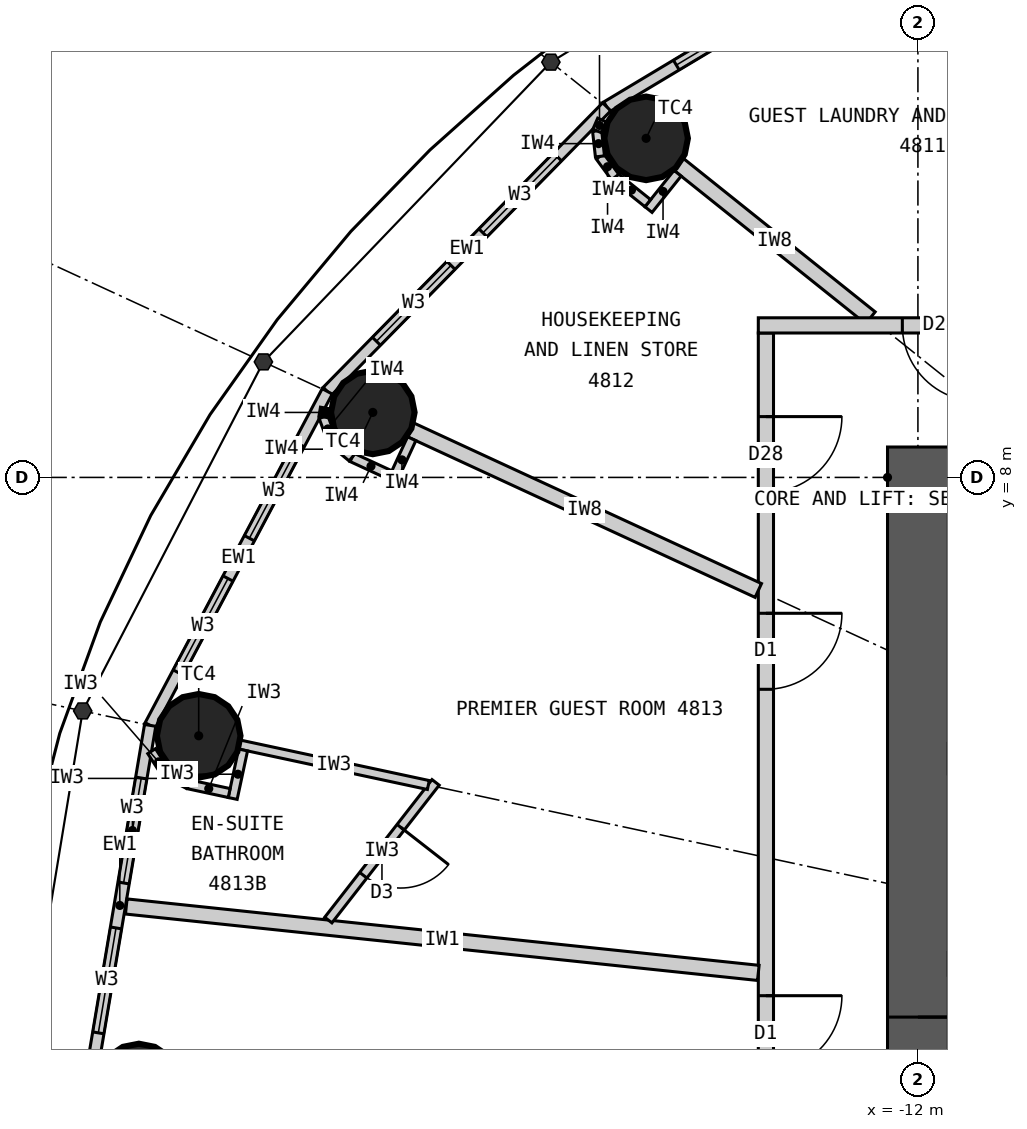
"""IFC4 building model, lengths in metres.
Left out: names, types, materials, properties, quantities, classifications, styles, units other than length and angle.
Written with IfcOpenShell. Run it as: python <this file> out.ifc"""

import sys

from ifc_helpers import new_model, si_unit, direction, frame, frame_2d, origin, origin_2d, place, context, subcontext, project, spatial, rectangle, circle, extrude, element, fill, save


model = new_model("IFC4")
c1 = context("Model", 3, precision=1e-05, world=origin(), true_north=direction((0.0, 1.0)))
c2 = subcontext(c1, "Body", "Model", "MODEL_VIEW")
j1 = project(units=[si_unit("LENGTHUNIT", "METRE"), si_unit("PLANEANGLEUNIT", "RADIAN")], contexts=[c1])
p1 = place(None, origin())
s1 = spatial("IfcSite", under=j1, at=p1, CompositionType="ELEMENT")
p2 = place(p1, origin())
s2 = spatial("IfcBuilding", under=s1, at=p2, CompositionType="ELEMENT")
p3 = place(p2, frame((0.0, 0.0, 179.7)))
s3 = spatial("IfcBuildingStorey", under=s2, at=p3, CompositionType="ELEMENT", Elevation=179.7)
for number, where, z_axis, x_axis in (
    (1, (-15.576, 12.461, 0.0), (0.0, 0.0, 1.0), (1.0, 0.0, 0.0)),
    (2, (-19.172, 8.855, 0.0), (0.0, 0.0, 1.0), (1.0, 0.0, 0.0)),
    (3, (-21.463, 4.601, 0.0), (0.0, 0.0, 1.0), (1.0, 0.0, 0.0)),
    (4, (-22.25, 0.0, 0.0), (0.0, 0.0, 1.0), (1.0, 0.0, 0.0)),
):
    element("IfcColumn", number, at=place(p3, frame(where, z_axis=z_axis, x_axis=x_axis)), inside=s3, PredefinedType="COLUMN", context=c2, shape_type="SweptSolid", body=[
        extrude(circle(Radius=0.55, at=origin_2d()), origin(), (0.0, 0.0, 1.0), 3.3),
    ])
p4 = place(p3, frame((-12.4, 8.0, 0.0), z_axis=(0.0, 0.0, 1.0), x_axis=(1.0, 0.0, 0.0)))
e5 = element("IfcWall", 5, at=p4, inside=s3, PredefinedType="SHEAR", context=c2, shape_type="SweptSolid", body=[
    extrude(rectangle(XDim=24.8, YDim=0.8, at=frame_2d((12.4, 0.0))), origin(), (0.0, 0.0, 1.0), 3.3),
])
p5 = place(p4, frame((11.1, 0.0, 0.0)))
e6 = element("IfcOpeningElement", 6, at=p5, cuts=e5, PredefinedType="OPENING", context=c2, shape_type="SweptSolid", body=[
    extrude(rectangle(XDim=1.2, YDim=2.2, at=frame_2d((0.6, 1.1))), frame((0.0, 0.41, 0.0), z_axis=(0.0, -1.0, 0.0), x_axis=(1.0, 0.0, 0.0)), (0.0, 0.0, 1.0), 0.82),
])
p6 = place(p4, frame((18.7, 0.0, 0.0)))
e7 = element("IfcOpeningElement", 7, at=p6, cuts=e5, PredefinedType="OPENING", context=c2, shape_type="SweptSolid", body=[
    extrude(rectangle(XDim=0.9, YDim=2.2, at=frame_2d((0.45, 1.1))), frame((0.0, 0.41, 0.0), z_axis=(0.0, -1.0, 0.0), x_axis=(1.0, 0.0, 0.0)), (0.0, 0.0, 1.0), 0.82),
])
p7 = place(p3, frame((-12.0, 7.6, 0.0), z_axis=(0.0, 0.0, 1.0), x_axis=(0.0, -1.0, 0.0)))
e8 = element("IfcWall", 8, at=p7, inside=s3, PredefinedType="SHEAR", context=c2, shape_type="SweptSolid", body=[
    extrude(rectangle(XDim=15.2, YDim=0.8, at=frame_2d((7.6, 0.0))), origin(), (0.0, 0.0, 1.0), 3.3),
])
p8 = place(p7, frame((6.7, 0.0, 0.0)))
e9 = element("IfcOpeningElement", 9, at=p8, cuts=e8, PredefinedType="OPENING", context=c2, shape_type="SweptSolid", body=[
    extrude(rectangle(XDim=1.8, YDim=2.2, at=frame_2d((0.9, 1.1))), frame((0.0, 0.41, 0.0), z_axis=(0.0, -1.0, 0.0), x_axis=(1.0, 0.0, 0.0)), (0.0, 0.0, 1.0), 0.82),
])
p9 = place(p3, frame((-11.346, 15.722, 0.0), z_axis=(0.0, 0.0, 1.0), x_axis=(-0.857695199231, -0.514158482587, 0.0)))
e10 = element("IfcWall", 10, at=p9, inside=s3, PredefinedType="ELEMENTEDWALL", context=c2, shape_type="SweptSolid", body=[
    extrude(rectangle(XDim=5.536, YDim=0.15, at=frame_2d((2.768, 0.0))), origin(), (0.0, 0.0, 1.0), 3.12),
])
p10 = place(p9, frame((1.068, 0.0, 0.9)))
e11 = element("IfcOpeningElement", 11, at=p10, cuts=e10, PredefinedType="OPENING", context=c2, shape_type="SweptSolid", body=[
    extrude(rectangle(XDim=1.4, YDim=1.9, at=frame_2d((0.7, 0.95))), frame((0.0, 0.085, 0.0), z_axis=(0.0, -1.0, 0.0), x_axis=(1.0, 0.0, 0.0)), (0.0, 0.0, 1.0), 0.17),
])
p11 = place(p9, frame((3.068, 0.0, 0.9)))
e12 = element("IfcOpeningElement", 12, at=p11, cuts=e10, PredefinedType="OPENING", context=c2, shape_type="SweptSolid", body=[
    extrude(rectangle(XDim=1.4, YDim=1.9, at=frame_2d((0.7, 0.95))), frame((0.0, 0.085, 0.0), z_axis=(0.0, -1.0, 0.0), x_axis=(1.0, 0.0, 0.0)), (0.0, 0.0, 1.0), 0.17),
])
p12 = place(p3, frame((-16.095, 12.876, 0.0), z_axis=(0.0, 0.0, 1.0), x_axis=(-0.700727467776, -0.71342905457, 0.0)))
e13 = element("IfcWall", 13, at=p12, inside=s3, PredefinedType="ELEMENTEDWALL", context=c2, shape_type="SweptSolid", body=[
    extrude(rectangle(XDim=5.247, YDim=0.15, at=frame_2d((2.624, 0.0))), origin(), (0.0, 0.0, 1.0), 3.12),
])
p13 = place(p12, frame((0.924, 0.0, 0.9)))
e14 = element("IfcOpeningElement", 14, at=p13, cuts=e13, PredefinedType="OPENING", context=c2, shape_type="SweptSolid", body=[
    extrude(rectangle(XDim=1.4, YDim=1.9, at=frame_2d((0.7, 0.95))), frame((0.0, 0.085, 0.0), z_axis=(0.0, -1.0, 0.0), x_axis=(1.0, 0.0, 0.0)), (0.0, 0.0, 1.0), 0.17),
])
p14 = place(p12, frame((2.924, 0.0, 0.9)))
e15 = element("IfcOpeningElement", 15, at=p14, cuts=e13, PredefinedType="OPENING", context=c2, shape_type="SweptSolid", body=[
    extrude(rectangle(XDim=1.4, YDim=1.9, at=frame_2d((0.7, 0.95))), frame((0.0, 0.085, 0.0), z_axis=(0.0, -1.0, 0.0), x_axis=(1.0, 0.0, 0.0)), (0.0, 0.0, 1.0), 0.17),
])
p15 = place(p3, frame((-19.772, 9.132, 0.0), z_axis=(0.0, 0.0, 1.0), x_axis=(-0.468428906714, -0.883501193748, 0.0)))
e16 = element("IfcWall", 16, at=p15, inside=s3, PredefinedType="ELEMENTEDWALL", context=c2, shape_type="SweptSolid", body=[
    extrude(rectangle(XDim=4.974, YDim=0.15, at=frame_2d((2.487, 0.0))), origin(), (0.0, 0.0, 1.0), 3.12),
])
p16 = place(p15, frame((0.787, 0.0, 0.9)))
e17 = element("IfcOpeningElement", 17, at=p16, cuts=e16, PredefinedType="OPENING", context=c2, shape_type="SweptSolid", body=[
    extrude(rectangle(XDim=1.4, YDim=1.9, at=frame_2d((0.7, 0.95))), frame((0.0, 0.085, 0.0), z_axis=(0.0, -1.0, 0.0), x_axis=(1.0, 0.0, 0.0)), (0.0, 0.0, 1.0), 0.17),
])
p17 = place(p15, frame((2.787, 0.0, 0.9)))
e18 = element("IfcOpeningElement", 18, at=p17, cuts=e16, PredefinedType="OPENING", context=c2, shape_type="SweptSolid", body=[
    extrude(rectangle(XDim=1.4, YDim=1.9, at=frame_2d((0.7, 0.95))), frame((0.0, 0.085, 0.0), z_axis=(0.0, -1.0, 0.0), x_axis=(1.0, 0.0, 0.0)), (0.0, 0.0, 1.0), 0.17),
])
p18 = place(p3, frame((-22.102, 4.738, 0.0), z_axis=(0.0, 0.0, 1.0), x_axis=(-0.166162111254, -0.986098449843, 0.0)))
e19 = element("IfcWall", 19, at=p18, inside=s3, PredefinedType="ELEMENTEDWALL", context=c2, shape_type="SweptSolid", body=[
    extrude(rectangle(XDim=4.805, YDim=0.15, at=frame_2d((2.402, 0.0))), origin(), (0.0, 0.0, 1.0), 3.12),
])
p19 = place(p18, frame((0.702, 0.0, 0.9)))
e20 = element("IfcOpeningElement", 20, at=p19, cuts=e19, PredefinedType="OPENING", context=c2, shape_type="SweptSolid", body=[
    extrude(rectangle(XDim=1.4, YDim=1.9, at=frame_2d((0.7, 0.95))), frame((0.0, 0.085, 0.0), z_axis=(0.0, -1.0, 0.0), x_axis=(1.0, 0.0, 0.0)), (0.0, 0.0, 1.0), 0.17),
])
p20 = place(p18, frame((2.702, 0.0, 0.9)))
e21 = element("IfcOpeningElement", 21, at=p20, cuts=e19, PredefinedType="OPENING", context=c2, shape_type="SweptSolid", body=[
    extrude(rectangle(XDim=1.4, YDim=1.9, at=frame_2d((0.7, 0.95))), frame((0.0, 0.085, 0.0), z_axis=(0.0, -1.0, 0.0), x_axis=(1.0, 0.0, 0.0)), (0.0, 0.0, 1.0), 0.17),
])
p21 = place(p3, frame((-14.0, 9.9, 0.0), z_axis=(0.0, 0.0, 1.0), x_axis=(0.0, -1.0, 0.0)))
e22 = element("IfcWall", 22, at=p21, inside=s3, PredefinedType="PARTITIONING", context=c2, shape_type="SweptSolid", body=[
    extrude(rectangle(XDim=19.8, YDim=0.2, at=frame_2d((9.9, 0.0))), origin(), (0.0, 0.0, 1.0), 3.12),
])
p22 = place(p21, frame((13.853, 0.0, 0.0)))
e23 = element("IfcOpeningElement", 23, at=p22, cuts=e22, PredefinedType="OPENING", context=c2, shape_type="SweptSolid", body=[
    extrude(rectangle(XDim=1.0, YDim=2.2, at=frame_2d((0.5, 1.1))), frame((0.0, 0.11, 0.0), z_axis=(0.0, -1.0, 0.0), x_axis=(1.0, 0.0, 0.0)), (0.0, 0.0, 1.0), 0.22),
])
p23 = place(p21, frame((1.1, 0.0, 0.0)))
e24 = element("IfcOpeningElement", 24, at=p23, cuts=e22, PredefinedType="OPENING", context=c2, shape_type="SweptSolid", body=[
    extrude(rectangle(XDim=1.0, YDim=2.2, at=frame_2d((0.5, 1.1))), frame((0.0, 0.11, 0.0), z_axis=(0.0, -1.0, 0.0), x_axis=(1.0, 0.0, 0.0)), (0.0, 0.0, 1.0), 0.22),
])
p24 = place(p21, frame((3.688, 0.0, 0.0)))
e25 = element("IfcOpeningElement", 25, at=p24, cuts=e22, PredefinedType="OPENING", context=c2, shape_type="SweptSolid", body=[
    extrude(rectangle(XDim=1.0, YDim=2.2, at=frame_2d((0.5, 1.1))), frame((0.0, 0.11, 0.0), z_axis=(0.0, -1.0, 0.0), x_axis=(1.0, 0.0, 0.0)), (0.0, 0.0, 1.0), 0.22),
])
p25 = place(p21, frame((8.719, 0.0, 0.0)))
e26 = element("IfcOpeningElement", 26, at=p25, cuts=e22, PredefinedType="OPENING", context=c2, shape_type="SweptSolid", body=[
    extrude(rectangle(XDim=1.0, YDim=2.2, at=frame_2d((0.5, 1.1))), frame((0.0, 0.11, 0.0), z_axis=(0.0, -1.0, 0.0), x_axis=(1.0, 0.0, 0.0)), (0.0, 0.0, 1.0), 0.22),
])
p26 = place(p3, frame((-12.625, 10.1, 0.0), z_axis=(0.0, 0.0, 1.0), x_axis=(-0.780876185034, 0.624685827954, 0.0)))
e27 = element("IfcWall", 27, at=p26, inside=s3, PredefinedType="PARTITIONING", context=c2, shape_type="SweptSolid", body=[
    extrude(rectangle(XDim=3.229, YDim=0.2, at=frame_2d((1.615, 0.0))), origin(), (0.0, 0.0, 1.0), 2.27),
])
p27 = place(p3, frame((-14.1, 6.512, 0.0), z_axis=(0.0, 0.0, 1.0), x_axis=(-0.907823150669, 0.419353224751, 0.0)))
e28 = element("IfcWall", 28, at=p27, inside=s3, PredefinedType="PARTITIONING", context=c2, shape_type="SweptSolid", body=[
    extrude(rectangle(XDim=5.037, YDim=0.2, at=frame_2d((2.519, 0.0))), origin(), (0.0, 0.0, 1.0), 2.22),
])
p28 = place(p3, frame((-14.1, 1.481, 0.0), z_axis=(0.0, 0.0, 1.0), x_axis=(-0.994524794819, 0.104500873159, 0.0)))
e29 = element("IfcWall", 29, at=p28, inside=s3, PredefinedType="PARTITIONING", context=c2, shape_type="SweptSolid", body=[
    extrude(rectangle(XDim=8.362, YDim=0.2, at=frame_2d((4.181, 0.0))), origin(), (0.0, 0.0, 1.0), 2.37),
])
p29 = place(p3, frame((-19.758, 2.177, 0.0), z_axis=(0.0, 0.0, 1.0), x_axis=(0.614713147302, 0.788750750576, 0.0)))
e30 = element("IfcWall", 30, at=p29, inside=s3, PredefinedType="PARTITIONING", context=c2, shape_type="SweptSolid", body=[
    extrude(rectangle(XDim=2.296, YDim=0.12, at=frame_2d((1.148, 0.0))), origin(), (0.0, 0.0, 1.0), 3.12),
])
p30 = place(p29, frame((0.748, 0.0, 0.0)))
e31 = element("IfcOpeningElement", 31, at=p30, cuts=e30, PredefinedType="OPENING", context=c2, shape_type="SweptSolid", body=[
    extrude(rectangle(XDim=0.8, YDim=2.1, at=frame_2d((0.4, 1.05))), frame((0.0, 0.07, 0.0), z_axis=(0.0, -1.0, 0.0), x_axis=(1.0, 0.0, 0.0)), (0.0, 0.0, 1.0), 0.14),
])
p31 = place(p3, frame((-18.441, 3.953, 0.0), z_axis=(0.0, 0.0, 1.0), x_axis=(-0.977801007461, 0.209535652833, 0.0)))
e32 = element("IfcWall", 32, at=p31, inside=s3, PredefinedType="PARTITIONING", context=c2, shape_type="SweptSolid", body=[
    extrude(rectangle(XDim=2.54, YDim=0.12, at=frame_2d((1.27, 0.0))), origin(), (0.0, 0.0, 1.0), 2.27),
])
p32 = place(p3, frame((-20.879, 4.414, 0.0), z_axis=(0.0, 0.0, 1.0), x_axis=(-0.209554644104, -0.977796937577, 0.0)))
e33 = element("IfcWall", 33, at=p32, inside=s3, PredefinedType="PARTITIONING", context=c2, shape_type="SweptSolid", body=[
    extrude(rectangle(XDim=0.652, YDim=0.12, at=frame_2d((0.326, 0.0))), origin(), (0.0, 0.0, 1.0), 3.12),
])
p33 = place(p3, frame((-21.062, 3.848, 0.0), z_axis=(0.0, 0.0, 1.0), x_axis=(-0.977789415726, 0.209589738521, 0.0)))
e34 = element("IfcWall", 34, at=p33, inside=s3, PredefinedType="PARTITIONING", context=c2, shape_type="SweptSolid", body=[
    extrude(rectangle(XDim=0.55, YDim=0.12, at=frame_2d((0.275, 0.0))), origin(), (0.0, 0.0, 1.0), 3.12),
])
p34 = place(p3, frame((-21.599, 3.963, 0.0), z_axis=(0.0, 0.0, 1.0), x_axis=(-0.890193602875, 0.455582428766, 0.0)))
e35 = element("IfcWall", 35, at=p34, inside=s3, PredefinedType="PARTITIONING", context=c2, shape_type="SweptSolid", body=[
    extrude(rectangle(XDim=0.338, YDim=0.12, at=frame_2d((0.169, 0.0))), origin(), (0.0, 0.0, 1.0), 3.12),
])
p35 = place(p3, frame((-21.9, 4.117, 0.0), z_axis=(0.0, 0.0, 1.0), x_axis=(-0.543582688681, 0.839355622228, 0.0)))
e36 = element("IfcWall", 36, at=p35, inside=s3, PredefinedType="PARTITIONING", context=c2, shape_type="SweptSolid", body=[
    extrude(rectangle(XDim=0.336, YDim=0.12, at=frame_2d((0.168, 0.0))), origin(), (0.0, 0.0, 1.0), 3.12),
])
p36 = place(p3, frame((-14.1, 10.0, 0.0), z_axis=(0.0, 0.0, 1.0), x_axis=(1.0, 0.0, 0.0)))
e37 = element("IfcWall", 37, at=p36, inside=s3, PredefinedType="PARTITIONING", context=c2, shape_type="SweptSolid", body=[
    extrude(rectangle(XDim=15.808, YDim=0.2, at=frame_2d((7.904, 0.0))), origin(), (0.0, 0.0, 1.0), 3.12),
])
p37 = place(p36, frame((11.135, 0.0, 0.0)))
e38 = element("IfcOpeningElement", 38, at=p37, cuts=e37, PredefinedType="OPENING", context=c2, shape_type="SweptSolid", body=[
    extrude(rectangle(XDim=1.0, YDim=2.2, at=frame_2d((0.5, 1.1))), frame((0.0, 0.11, 0.0), z_axis=(0.0, -1.0, 0.0), x_axis=(1.0, 0.0, 0.0)), (0.0, 0.0, 1.0), 0.22),
])
p38 = place(p36, frame((1.895, 0.0, 0.0)))
e39 = element("IfcOpeningElement", 39, at=p38, cuts=e37, PredefinedType="OPENING", context=c2, shape_type="SweptSolid", body=[
    extrude(rectangle(XDim=1.0, YDim=2.2, at=frame_2d((0.5, 1.1))), frame((0.0, 0.11, 0.0), z_axis=(0.0, -1.0, 0.0), x_axis=(1.0, 0.0, 0.0)), (0.0, 0.0, 1.0), 0.22),
])
p39 = place(p3, frame((-15.162, 12.002, 0.0), z_axis=(0.0, 0.0, 1.0), x_axis=(-0.624597762427, -0.780946627607, 0.0)))
e40 = element("IfcWall", 40, at=p39, inside=s3, PredefinedType="PARTITIONING", context=c2, shape_type="SweptSolid", body=[
    extrude(rectangle(XDim=0.612, YDim=0.12, at=frame_2d((0.306, 0.0))), origin(), (0.0, 0.0, 1.0), 3.12),
])
p40 = place(p3, frame((-15.554, 11.608, 0.0), z_axis=(0.0, 0.0, 1.0), x_axis=(-0.780695577787, 0.624911525597, 0.0)))
e41 = element("IfcWall", 41, at=p40, inside=s3, PredefinedType="PARTITIONING", context=c2, shape_type="SweptSolid", body=[
    extrude(rectangle(XDim=0.55, YDim=0.12, at=frame_2d((0.275, 0.0))), origin(), (0.0, 0.0, 1.0), 3.12),
])
p41 = place(p3, frame((-15.984, 11.952, 0.0), z_axis=(0.0, 0.0, 1.0), x_axis=(-0.592335221171, 0.805691619517, 0.0)))
e42 = element("IfcWall", 42, at=p41, inside=s3, PredefinedType="PARTITIONING", context=c2, shape_type="SweptSolid", body=[
    extrude(rectangle(XDim=0.338, YDim=0.12, at=frame_2d((0.169, 0.0))), origin(), (0.0, 0.0, 1.0), 3.12),
])
p42 = place(p3, frame((-16.184, 12.224, 0.0), z_axis=(0.0, 0.0, 1.0), x_axis=(-0.110669692975, 0.993857242795, 0.0)))
e43 = element("IfcWall", 43, at=p42, inside=s3, PredefinedType="PARTITIONING", context=c2, shape_type="SweptSolid", body=[
    extrude(rectangle(XDim=0.337, YDim=0.12, at=frame_2d((0.169, 0.0))), origin(), (0.0, 0.0, 1.0), 3.12),
])
p43 = place(p3, frame((-16.221, 12.559, 0.0), z_axis=(0.0, 0.0, 1.0), x_axis=(0.401064416249, 0.916049853457, 0.0)))
e44 = element("IfcWall", 44, at=p43, inside=s3, PredefinedType="PARTITIONING", context=c2, shape_type="SweptSolid", body=[
    extrude(rectangle(XDim=0.156, YDim=0.12, at=frame_2d((0.078, 0.0))), origin(), (0.0, 0.0, 1.0), 3.12),
])
p44 = place(p3, frame((-18.66, 8.509, 0.0), z_axis=(0.0, 0.0, 1.0), x_axis=(-0.419083463716, -0.907947713494, 0.0)))
e45 = element("IfcWall", 45, at=p44, inside=s3, PredefinedType="PARTITIONING", context=c2, shape_type="SweptSolid", body=[
    extrude(rectangle(XDim=0.612, YDim=0.12, at=frame_2d((0.306, 0.0))), origin(), (0.0, 0.0, 1.0), 3.12),
])
p45 = place(p3, frame((-18.946, 8.032, 0.0), z_axis=(0.0, 0.0, 1.0), x_axis=(-0.907842467956, 0.419311403822, 0.0)))
e46 = element("IfcWall", 46, at=p45, inside=s3, PredefinedType="PARTITIONING", context=c2, shape_type="SweptSolid", body=[
    extrude(rectangle(XDim=0.55, YDim=0.12, at=frame_2d((0.275, 0.0))), origin(), (0.0, 0.0, 1.0), 3.12),
])
p46 = place(p3, frame((-19.446, 8.263, 0.0), z_axis=(0.0, 0.0, 1.0), x_axis=(-0.768221279597, 0.640184399664, 0.0)))
e47 = element("IfcWall", 47, at=p46, inside=s3, PredefinedType="PARTITIONING", context=c2, shape_type="SweptSolid", body=[
    extrude(rectangle(XDim=0.337, YDim=0.12, at=frame_2d((0.169, 0.0))), origin(), (0.0, 0.0, 1.0), 3.12),
])
p47 = place(p3, frame((-19.705, 8.479, 0.0), z_axis=(0.0, 0.0, 1.0), x_axis=(-0.345571344575, 0.938392479621, 0.0)))
e48 = element("IfcWall", 48, at=p47, inside=s3, PredefinedType="PARTITIONING", context=c2, shape_type="SweptSolid", body=[
    extrude(rectangle(XDim=0.338, YDim=0.12, at=frame_2d((0.169, 0.0))), origin(), (0.0, 0.0, 1.0), 3.12),
])
p48 = place(p3, frame((-19.822, 8.796, 0.0), z_axis=(0.0, 0.0, 1.0), x_axis=(0.169701508781, 0.985495508827, 0.0)))
e49 = element("IfcWall", 49, at=p48, inside=s3, PredefinedType="PARTITIONING", context=c2, shape_type="SweptSolid", body=[
    extrude(rectangle(XDim=0.119, YDim=0.12, at=frame_2d((0.06, 0.0))), origin(), (0.0, 0.0, 1.0), 3.12),
])
p49 = place(p11, origin())
e50 = element("IfcWindow", 50, at=p49, inside=s3, PartitioningType="SINGLE_PANEL", PredefinedType="WINDOW", context=c2, shape_type="SweptSolid", body=[
    extrude(rectangle(XDim=1.4, YDim=1.9, at=frame_2d((0.7, 0.95))), frame((0.0, 0.03, 0.0), z_axis=(0.0, -1.0, 0.0), x_axis=(1.0, 0.0, 0.0)), (0.0, 0.0, 1.0), 0.06),
])
fill(e12, e50)
p50 = place(p13, origin())
e51 = element("IfcWindow", 51, at=p50, inside=s3, PartitioningType="SINGLE_PANEL", PredefinedType="WINDOW", context=c2, shape_type="SweptSolid", body=[
    extrude(rectangle(XDim=1.4, YDim=1.9, at=frame_2d((0.7, 0.95))), frame((0.0, 0.03, 0.0), z_axis=(0.0, -1.0, 0.0), x_axis=(1.0, 0.0, 0.0)), (0.0, 0.0, 1.0), 0.06),
])
fill(e14, e51)
p51 = place(p14, origin())
e52 = element("IfcWindow", 52, at=p51, inside=s3, PartitioningType="SINGLE_PANEL", PredefinedType="WINDOW", context=c2, shape_type="SweptSolid", body=[
    extrude(rectangle(XDim=1.4, YDim=1.9, at=frame_2d((0.7, 0.95))), frame((0.0, 0.03, 0.0), z_axis=(0.0, -1.0, 0.0), x_axis=(1.0, 0.0, 0.0)), (0.0, 0.0, 1.0), 0.06),
])
fill(e15, e52)
p52 = place(p16, origin())
e53 = element("IfcWindow", 53, at=p52, inside=s3, PartitioningType="SINGLE_PANEL", PredefinedType="WINDOW", context=c2, shape_type="SweptSolid", body=[
    extrude(rectangle(XDim=1.4, YDim=1.9, at=frame_2d((0.7, 0.95))), frame((0.0, 0.03, 0.0), z_axis=(0.0, -1.0, 0.0), x_axis=(1.0, 0.0, 0.0)), (0.0, 0.0, 1.0), 0.06),
])
fill(e17, e53)
p53 = place(p17, origin())
e54 = element("IfcWindow", 54, at=p53, inside=s3, PartitioningType="SINGLE_PANEL", PredefinedType="WINDOW", context=c2, shape_type="SweptSolid", body=[
    extrude(rectangle(XDim=1.4, YDim=1.9, at=frame_2d((0.7, 0.95))), frame((0.0, 0.03, 0.0), z_axis=(0.0, -1.0, 0.0), x_axis=(1.0, 0.0, 0.0)), (0.0, 0.0, 1.0), 0.06),
])
fill(e18, e54)
p54 = place(p19, origin())
e55 = element("IfcWindow", 55, at=p54, inside=s3, PartitioningType="SINGLE_PANEL", PredefinedType="WINDOW", context=c2, shape_type="SweptSolid", body=[
    extrude(rectangle(XDim=1.4, YDim=1.9, at=frame_2d((0.7, 0.95))), frame((0.0, 0.03, 0.0), z_axis=(0.0, -1.0, 0.0), x_axis=(1.0, 0.0, 0.0)), (0.0, 0.0, 1.0), 0.06),
])
fill(e20, e55)
p55 = place(p20, origin())
e56 = element("IfcWindow", 56, at=p55, inside=s3, PartitioningType="SINGLE_PANEL", PredefinedType="WINDOW", context=c2, shape_type="SweptSolid", body=[
    extrude(rectangle(XDim=1.4, YDim=1.9, at=frame_2d((0.7, 0.95))), frame((0.0, 0.03, 0.0), z_axis=(0.0, -1.0, 0.0), x_axis=(1.0, 0.0, 0.0)), (0.0, 0.0, 1.0), 0.06),
])
fill(e21, e56)
p56 = place(p38, origin())
e57 = element("IfcDoor", 57, at=p56, inside=s3, OperationType="SINGLE_SWING_RIGHT", PredefinedType="DOOR", context=c2, shape_type="SweptSolid", body=[
    extrude(rectangle(XDim=1.0, YDim=2.2, at=frame_2d((0.5, 1.1))), frame((0.0, 0.025, 0.0), z_axis=(0.0, -1.0, 0.0), x_axis=(1.0, 0.0, 0.0)), (0.0, 0.0, 1.0), 0.05),
])
fill(e39, e57)
p57 = place(p23, origin())
e58 = element("IfcDoor", 58, at=p57, inside=s3, OperationType="SINGLE_SWING_LEFT", PredefinedType="DOOR", context=c2, shape_type="SweptSolid", body=[
    extrude(rectangle(XDim=1.0, YDim=2.2, at=frame_2d((0.5, 1.1))), frame((0.0, 0.025, 0.0), z_axis=(0.0, -1.0, 0.0), x_axis=(1.0, 0.0, 0.0)), (0.0, 0.0, 1.0), 0.05),
])
fill(e24, e58)
p58 = place(p30, origin())
e59 = element("IfcDoor", 59, at=p58, inside=s3, OperationType="SINGLE_SWING_RIGHT", PredefinedType="DOOR", context=c2, shape_type="SweptSolid", body=[
    extrude(rectangle(XDim=0.8, YDim=2.1, at=frame_2d((0.4, 1.05))), frame((0.0, 0.025, 0.0), z_axis=(0.0, -1.0, 0.0), x_axis=(1.0, 0.0, 0.0)), (0.0, 0.0, 1.0), 0.05),
])
fill(e31, e59)
p59 = place(p24, origin())
e60 = element("IfcDoor", 60, at=p59, inside=s3, OperationType="SINGLE_SWING_LEFT", PredefinedType="DOOR", context=c2, shape_type="SweptSolid", body=[
    extrude(rectangle(XDim=1.0, YDim=2.2, at=frame_2d((0.5, 1.1))), frame((0.0, 0.025, 0.0), z_axis=(0.0, -1.0, 0.0), x_axis=(1.0, 0.0, 0.0)), (0.0, 0.0, 1.0), 0.05),
])
fill(e25, e60)
p60 = place(p25, origin())
e61 = element("IfcDoor", 61, at=p60, inside=s3, OperationType="SINGLE_SWING_LEFT", PredefinedType="DOOR", context=c2, shape_type="SweptSolid", body=[
    extrude(rectangle(XDim=1.0, YDim=2.2, at=frame_2d((0.5, 1.1))), frame((0.0, 0.025, 0.0), z_axis=(0.0, -1.0, 0.0), x_axis=(1.0, 0.0, 0.0)), (0.0, 0.0, 1.0), 0.05),
])
fill(e26, e61)
p61 = place(p8, origin())
e62 = element("IfcDoor", 62, at=p61, inside=s3, OperationType="DOUBLE_DOOR_DOUBLE_SWING", PredefinedType="DOOR", context=c2, shape_type="SweptSolid", body=[
    extrude(rectangle(XDim=1.8, YDim=2.2, at=frame_2d((0.9, 1.1))), frame((0.0, 0.025, 0.0), z_axis=(0.0, -1.0, 0.0), x_axis=(1.0, 0.0, 0.0)), (0.0, 0.0, 1.0), 0.05),
])
fill(e9, e62)
save(model, sys.argv[1])
